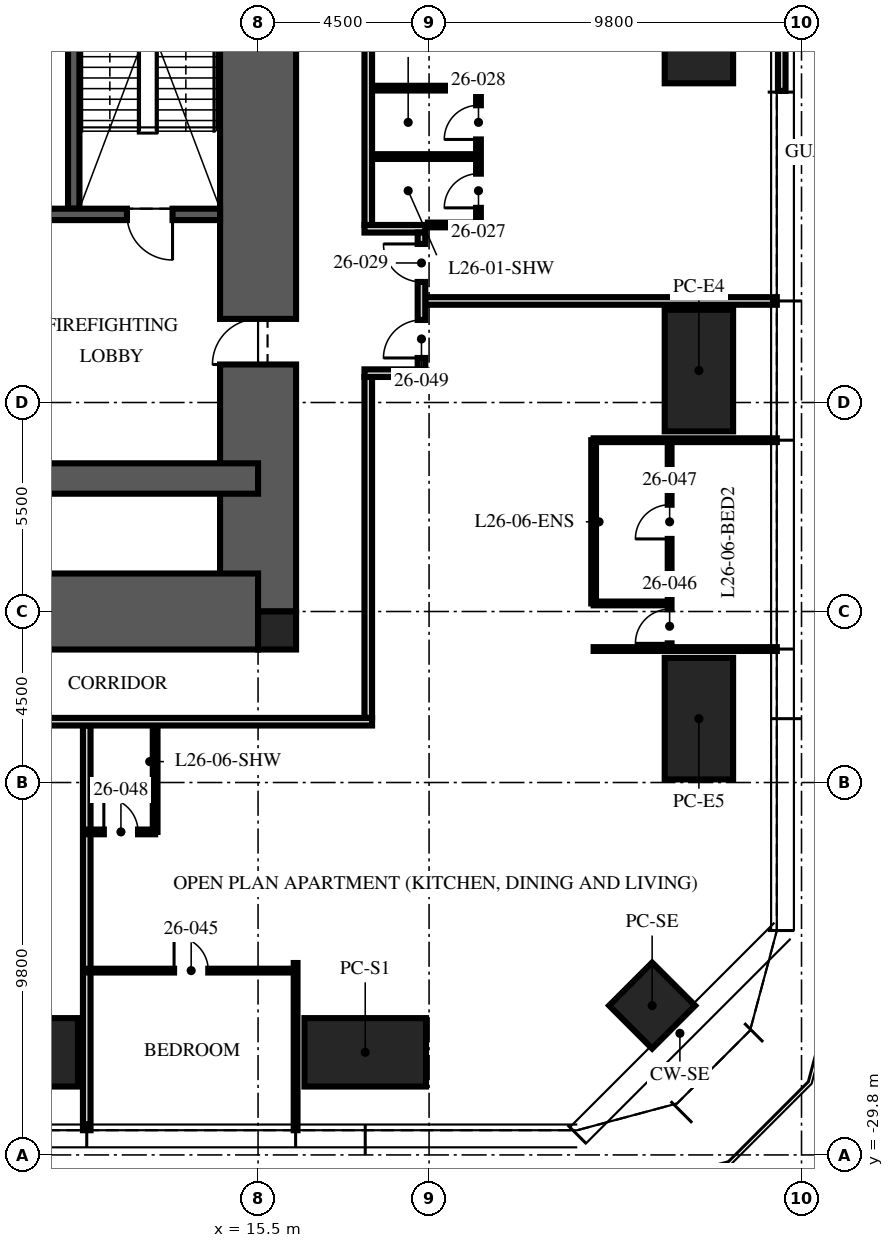
"""IFC4 building model, lengths in metres.
Left out: names, types, materials, properties, quantities, classifications, styles, units other than length and angle.
Written with IfcOpenShell. Run it as: python <this file> out.ifc"""

import sys

from ifc_helpers import new_model, si_unit, direction, frame, frame_2d, origin, origin_2d, place, context, subcontext, project, spatial, rectangle, hollow_rectangle, extrude, element, fill, save


model = new_model("IFC4")
c1 = context("Model", 3, precision=1e-05, world=origin(), true_north=direction((0.0, 1.0)))
c2 = subcontext(c1, "Body", "Model", "MODEL_VIEW")
j1 = project(units=[si_unit("LENGTHUNIT", "METRE"), si_unit("PLANEANGLEUNIT", "RADIAN")], contexts=[c1])
p1 = place(None, origin())
s1 = spatial("IfcSite", under=j1, at=p1, CompositionType="ELEMENT")
p2 = place(p1, origin())
s2 = spatial("IfcBuilding", under=s1, at=p2, CompositionType="ELEMENT")
p3 = place(p2, frame((0.0, 0.0, 107.25)))
s3 = spatial("IfcBuildingStorey", under=s2, at=p3, CompositionType="ELEMENT", Elevation=107.25)
p4 = place(p3, frame((15.5, -15.5, -0.25), z_axis=(0.0, 0.0, 1.0), x_axis=(0.0, 1.0, 0.0)))
e1 = element("IfcWall", 1, at=p4, inside=s3, PredefinedType="SHEAR", context=c2, shape_type="SweptSolid", body=[
    extrude(rectangle(XDim=31.0, YDim=2.0, at=frame_2d((15.5, 0.0))), origin(), (0.0, 0.0, 1.0), 3.75),
])
p5 = place(p4, frame((6.5, 0.0, 0.25)))
e2 = element("IfcOpeningElement", 2, at=p5, cuts=e1, PredefinedType="OPENING", context=c2, shape_type="SweptSolid", body=[
    extrude(rectangle(XDim=1.2, YDim=2.1, at=frame_2d((0.6, 1.05))), frame((0.0, 1.01, 0.0), z_axis=(0.0, -1.0, 0.0), x_axis=(1.0, 0.0, 0.0)), (0.0, 0.0, 1.0), 2.02),
])
p6 = place(p4, frame((23.0, 0.0, 0.25)))
e3 = element("IfcOpeningElement", 3, at=p6, cuts=e1, PredefinedType="OPENING", context=c2, shape_type="SweptSolid", body=[
    extrude(rectangle(XDim=1.8, YDim=2.1, at=frame_2d((0.9, 1.05))), frame((0.0, 1.01, 0.0), z_axis=(0.0, -1.0, 0.0), x_axis=(1.0, 0.0, 0.0)), (0.0, 0.0, 1.0), 2.02),
])
p7 = place(p3, frame((-15.5, -15.5, -0.25), z_axis=(0.0, 0.0, 1.0), x_axis=(1.0, 0.0, 0.0)))
e4 = element("IfcWall", 4, at=p7, inside=s3, PredefinedType="SHEAR", context=c2, shape_type="SweptSolid", body=[
    extrude(rectangle(XDim=31.0, YDim=2.0, at=frame_2d((15.5, 0.0))), origin(), (0.0, 0.0, 1.0), 3.75),
])
p8 = place(p7, frame((10.4, 0.0, 0.25)))
e5 = element("IfcOpeningElement", 5, at=p8, cuts=e4, PredefinedType="OPENING", context=c2, shape_type="SweptSolid", body=[
    extrude(rectangle(XDim=1.1, YDim=2.1, at=frame_2d((0.55, 1.05))), frame((0.0, 1.01, 0.0), z_axis=(0.0, -1.0, 0.0), x_axis=(1.0, 0.0, 0.0)), (0.0, 0.0, 1.0), 2.02),
])
p9 = place(p7, frame((13.5, 0.0, 0.25)))
e6 = element("IfcOpeningElement", 6, at=p9, cuts=e4, PredefinedType="OPENING", context=c2, shape_type="SweptSolid", body=[
    extrude(rectangle(XDim=1.1, YDim=2.1, at=frame_2d((0.55, 1.05))), frame((0.0, 1.01, 0.0), z_axis=(0.0, -1.0, 0.0), x_axis=(1.0, 0.0, 0.0)), (0.0, 0.0, 1.0), 2.02),
])
p10 = place(p7, frame((16.6, 0.0, 0.25)))
e7 = element("IfcOpeningElement", 7, at=p10, cuts=e4, PredefinedType="OPENING", context=c2, shape_type="SweptSolid", body=[
    extrude(rectangle(XDim=1.1, YDim=2.1, at=frame_2d((0.55, 1.05))), frame((0.0, 1.01, 0.0), z_axis=(0.0, -1.0, 0.0), x_axis=(1.0, 0.0, 0.0)), (0.0, 0.0, 1.0), 2.02),
])
p11 = place(p3, frame((-15.5, -12.0, -0.25), z_axis=(0.0, 0.0, 1.0), x_axis=(1.0, 0.0, 0.0)))
e8 = element("IfcWall", 8, at=p11, inside=s3, PredefinedType="SHEAR", context=c2, shape_type="SweptSolid", body=[
    extrude(rectangle(XDim=31.0, YDim=0.8, at=frame_2d((15.5, 0.0))), origin(), (0.0, 0.0, 1.0), 3.75),
])
p12 = place(p3, frame((16.0, -16.0, -0.25), z_axis=(0.0, 0.0, 1.0), x_axis=(1.0, 0.0, 0.0)))
e9 = element("IfcColumn", 9, at=p12, inside=s3, PredefinedType="COLUMN", context=c2, shape_type="SweptSolid", body=[
    extrude(rectangle(XDim=1.0, YDim=1.0, at=origin_2d()), origin(), (0.0, 0.0, 1.0), 3.75),
])
p13 = place(p3, frame((27.1, 0.0, -0.23), z_axis=(0.0, 0.0, 1.0), x_axis=(0.0, 1.0, 0.0)))
e10 = element("IfcColumn", 10, at=p13, inside=s3, PredefinedType="COLUMN", context=c2, shape_type="SweptSolid", body=[
    extrude(hollow_rectangle(XDim=3.2, YDim=1.8, WallThickness=0.2, at=origin_2d()), origin(), (0.0, 0.0, 1.0), 3.98),
])
p14 = place(p3, frame((27.1, -9.16, -0.07), z_axis=(0.0, 0.0, 1.0), x_axis=(0.0, 1.0, 0.0)))
e11 = element("IfcColumn", 11, at=p14, inside=s3, PredefinedType="COLUMN", context=c2, shape_type="SweptSolid", body=[
    extrude(hollow_rectangle(XDim=3.2, YDim=1.8, WallThickness=0.2, at=origin_2d()), origin(), (0.0, 0.0, 1.0), 3.82),
])
for number, where, z_axis, x_axis in (
    (12, (27.1, -18.32, 0.08), (0.0, 0.0, 1.0), (0.0, 1.0, 0.0)),
    (13, (18.32, -27.1, 0.08), (0.0, 0.0, 1.0), (1.0, 0.0, 0.0)),
):
    element("IfcColumn", number, at=place(p3, frame(where, z_axis=z_axis, x_axis=x_axis)), inside=s3, PredefinedType="COLUMN", context=c2, shape_type="SweptSolid", body=[
        extrude(hollow_rectangle(XDim=3.2, YDim=1.8, WallThickness=0.2, at=origin_2d()), origin(), (0.0, 0.0, 1.0), 3.67),
    ])
p15 = place(p3, frame((9.16, -27.1, -0.07), z_axis=(0.0, 0.0, 1.0), x_axis=(1.0, 0.0, 0.0)))
e14 = element("IfcColumn", 14, at=p15, inside=s3, PredefinedType="COLUMN", context=c2, shape_type="SweptSolid", body=[
    extrude(hollow_rectangle(XDim=3.2, YDim=1.8, WallThickness=0.2, at=origin_2d()), origin(), (0.0, 0.0, 1.0), 3.82),
])
p16 = place(p3, frame((25.87, -25.87, -0.19), z_axis=(0.0, 0.0, 1.0), x_axis=(0.707106781187, 0.707106781187, 0.0)))
e15 = element("IfcColumn", 15, at=p16, inside=s3, PredefinedType="COLUMN", context=c2, shape_type="SweptSolid", body=[
    extrude(hollow_rectangle(XDim=1.6, YDim=1.6, WallThickness=0.1, at=origin_2d()), origin(), (0.0, 0.0, 1.0), 3.94),
])
p17 = place(p3, frame((29.28, -1.8, 0.0), z_axis=(0.0, 0.0, 1.0), x_axis=(0.0, 1.0, 0.0)))
e16 = element("IfcWall", 16, at=p17, inside=s3, PredefinedType="ELEMENTEDWALL", context=c2, shape_type="SweptSolid", body=[
    extrude(rectangle(XDim=3.599, YDim=0.2, at=frame_2d((1.8, 0.0))), origin(), (0.0, 0.0, 1.0), 3.75),
])
p18 = place(p17, frame((1.3, 0.0, 0.0)))
e17 = element("IfcOpeningElement", 17, at=p18, cuts=e16, PredefinedType="OPENING", context=c2, shape_type="SweptSolid", body=[
    extrude(rectangle(XDim=1.0, YDim=2.4, at=frame_2d((0.5, 1.2))), frame((0.0, 0.11, 0.0), z_axis=(0.0, -1.0, 0.0), x_axis=(1.0, 0.0, 0.0)), (0.0, 0.0, 1.0), 0.22),
])
p19 = place(p3, frame((10.65, -4.9, 0.0), z_axis=(0.0, 0.0, 1.0), x_axis=(0.0, 1.0, 0.0)))
e18 = element("IfcWall", 18, at=p19, inside=s3, PredefinedType="SOLIDWALL", context=c2, shape_type="SweptSolid", body=[
    extrude(rectangle(XDim=10.1, YDim=0.3, at=frame_2d((5.05, 0.0))), origin(), (0.0, 0.0, 1.0), 3.5),
])
p20 = place(p3, frame((14.5, -5.05, 0.0), z_axis=(0.0, 0.0, 1.0), x_axis=(-1.0, 0.0, 0.0)))
e19 = element("IfcWall", 19, at=p20, inside=s3, PredefinedType="SOLIDWALL", context=c2, shape_type="SweptSolid", body=[
    extrude(rectangle(XDim=5.7, YDim=0.3, at=frame_2d((2.85, 0.0))), origin(), (0.0, 0.0, 1.0), 3.5),
])
p21 = place(p20, frame((1.25, 0.0, 0.0)))
e20 = element("IfcOpeningElement", 20, at=p21, cuts=e19, PredefinedType="OPENING", context=c2, shape_type="SweptSolid", body=[
    extrude(rectangle(XDim=1.2, YDim=2.1, at=frame_2d((0.6, 1.05))), frame((0.0, 0.16, 0.0), z_axis=(0.0, -1.0, 0.0), x_axis=(1.0, 0.0, 0.0)), (0.0, 0.0, 1.0), 0.32),
])
p22 = place(p3, frame((19.9, -7.328, 0.0), z_axis=(0.0, 0.0, 1.0), x_axis=(1.0, 0.0, 0.0)))
e21 = element("IfcWall", 21, at=p22, inside=s3, PredefinedType="PARTITIONING", context=c2, shape_type="SweptSolid", body=[
    extrude(rectangle(XDim=9.25, YDim=0.2, at=frame_2d((4.625, 0.0))), origin(), (0.0, 0.0, 1.0), 2.81),
])
p23 = place(p3, frame((10.992, -18.5, 0.0), z_axis=(0.0, 0.0, 1.0), x_axis=(0.0, -1.0, 0.0)))
e22 = element("IfcWall", 22, at=p23, inside=s3, PredefinedType="PARTITIONING", context=c2, shape_type="SweptSolid", body=[
    extrude(rectangle(XDim=10.65, YDim=0.2, at=frame_2d((5.325, 0.0))), origin(), (0.0, 0.0, 1.0), 2.81),
])
p24 = place(p3, frame((16.488, -24.75, 0.0), z_axis=(0.0, 0.0, 1.0), x_axis=(0.0, -1.0, 0.0)))
e23 = element("IfcWall", 23, at=p24, inside=s3, PredefinedType="PARTITIONING", context=c2, shape_type="SweptSolid", body=[
    extrude(rectangle(XDim=4.4, YDim=0.1, at=frame_2d((2.2, 0.0))), origin(), (0.0, 0.0, 1.0), 2.81),
])
for number, where, z_axis, x_axis in (
    (24, (24.33, -16.488, 0.0), (0.0, 0.0, 1.0), (1.0, 0.0, 0.0)),
    (25, (24.33, -10.992, 0.0), (0.0, 0.0, 1.0), (1.0, 0.0, 0.0)),
):
    element("IfcWall", number, at=place(p3, frame(where, z_axis=z_axis, x_axis=x_axis)), inside=s3, PredefinedType="PARTITIONING", context=c2, shape_type="SweptSolid", body=[
        extrude(rectangle(XDim=4.82, YDim=0.1, at=frame_2d((2.41, 0.0))), origin(), (0.0, 0.0, 1.0), 2.81),
    ])
p25 = place(p3, frame((21.3, -5.328, 0.0), z_axis=(0.0, 0.0, 1.0), x_axis=(0.0, 1.0, 0.0)))
e26 = element("IfcWall", 26, at=p25, inside=s3, PredefinedType="PARTITIONING", context=c2, shape_type="SweptSolid", body=[
    extrude(rectangle(XDim=3.6, YDim=0.125, at=frame_2d((1.8, 0.0))), origin(), (0.0, 0.0, 1.0), 2.81),
])
p26 = place(p25, frame((0.45, 0.0, 0.0)))
e27 = element("IfcOpeningElement", 27, at=p26, cuts=e26, PredefinedType="OPENING", context=c2, shape_type="SweptSolid", body=[
    extrude(rectangle(XDim=0.9, YDim=2.1, at=frame_2d((0.45, 1.05))), frame((0.0, 0.073, 0.0), z_axis=(0.0, -1.0, 0.0), x_axis=(1.0, 0.0, 0.0)), (0.0, 0.0, 1.0), 0.145),
])
p27 = place(p25, frame((2.25, 0.0, 0.0)))
e28 = element("IfcOpeningElement", 28, at=p27, cuts=e26, PredefinedType="OPENING", context=c2, shape_type="SweptSolid", body=[
    extrude(rectangle(XDim=0.9, YDim=2.1, at=frame_2d((0.45, 1.05))), frame((0.0, 0.073, 0.0), z_axis=(0.0, -1.0, 0.0), x_axis=(1.0, 0.0, 0.0)), (0.0, 0.0, 1.0), 0.145),
])
p28 = place(p3, frame((19.97, -5.328, 0.0), z_axis=(0.0, 0.0, 1.0), x_axis=(1.0, 0.0, 0.0)))
e29 = element("IfcWall", 29, at=p28, inside=s3, PredefinedType="PARTITIONING", context=c2, shape_type="SweptSolid", body=[
    extrude(rectangle(XDim=1.33, YDim=0.125, at=frame_2d((0.665, 0.0))), origin(), (0.0, 0.0, 1.0), 3.5),
])
for number, where, z_axis, x_axis in (
    (30, (18.5, -3.528, 0.0), (0.0, 0.0, 1.0), (1.0, 0.0, 0.0)),
    (31, (18.5, -1.728, 0.0), (0.0, 0.0, 1.0), (1.0, 0.0, 0.0)),
):
    element("IfcWall", number, at=place(p3, frame(where, z_axis=z_axis, x_axis=x_axis)), inside=s3, PredefinedType="PARTITIONING", context=c2, shape_type="SweptSolid", body=[
        extrude(rectangle(XDim=2.8, YDim=0.125, at=frame_2d((1.4, 0.0))), origin(), (0.0, 0.0, 1.0), 3.5),
    ])
p29 = place(p3, frame((10.992, -24.95, 0.0), z_axis=(0.0, 0.0, 1.0), x_axis=(1.0, 0.0, 0.0)))
e32 = element("IfcWall", 32, at=p29, inside=s3, PredefinedType="PARTITIONING", context=c2, shape_type="SweptSolid", body=[
    extrude(rectangle(XDim=5.496, YDim=0.1, at=frame_2d((2.748, 0.0))), origin(), (0.0, 0.0, 1.0), 2.81),
])
p30 = place(p29, frame((2.298, 0.0, 0.0)))
e33 = element("IfcOpeningElement", 33, at=p30, cuts=e32, PredefinedType="OPENING", context=c2, shape_type="SweptSolid", body=[
    extrude(rectangle(XDim=0.9, YDim=2.1, at=frame_2d((0.45, 1.05))), frame((0.0, 0.06, 0.0), z_axis=(0.0, -1.0, 0.0), x_axis=(1.0, 0.0, 0.0)), (0.0, 0.0, 1.0), 0.12),
])
p31 = place(p3, frame((26.33, -16.488, 0.0), z_axis=(0.0, 0.0, 1.0), x_axis=(0.0, 1.0, 0.0)))
e34 = element("IfcWall", 34, at=p31, inside=s3, PredefinedType="PARTITIONING", context=c2, shape_type="SweptSolid", body=[
    extrude(rectangle(XDim=5.496, YDim=0.1, at=frame_2d((2.748, 0.0))), origin(), (0.0, 0.0, 1.0), 2.81),
])
p32 = place(p31, frame((0.15, 0.0, 0.0)))
e35 = element("IfcOpeningElement", 35, at=p32, cuts=e34, PredefinedType="OPENING", context=c2, shape_type="SweptSolid", body=[
    extrude(rectangle(XDim=0.9, YDim=2.1, at=frame_2d((0.45, 1.05))), frame((0.0, 0.06, 0.0), z_axis=(0.0, -1.0, 0.0), x_axis=(1.0, 0.0, 0.0)), (0.0, 0.0, 1.0), 0.12),
])
p33 = place(p31, frame((2.898, 0.0, 0.0)))
e36 = element("IfcOpeningElement", 36, at=p33, cuts=e34, PredefinedType="OPENING", context=c2, shape_type="SweptSolid", body=[
    extrude(rectangle(XDim=0.9, YDim=2.1, at=frame_2d((0.45, 1.05))), frame((0.0, 0.06, 0.0), z_axis=(0.0, -1.0, 0.0), x_axis=(1.0, 0.0, 0.0)), (0.0, 0.0, 1.0), 0.12),
])
p34 = place(p3, frame((24.33, -15.288, 0.0), z_axis=(0.0, 0.0, 1.0), x_axis=(1.0, 0.0, 0.0)))
e37 = element("IfcWall", 37, at=p34, inside=s3, PredefinedType="PARTITIONING", context=c2, shape_type="SweptSolid", body=[
    extrude(rectangle(XDim=2.0, YDim=0.1, at=frame_2d((1.0, 0.0))), origin(), (0.0, 0.0, 1.0), 3.5),
])
p35 = place(p3, frame((24.33, -15.288, 0.0), z_axis=(0.0, 0.0, 1.0), x_axis=(0.0, 1.0, 0.0)))
e38 = element("IfcWall", 38, at=p35, inside=s3, PredefinedType="PARTITIONING", context=c2, shape_type="SweptSolid", body=[
    extrude(rectangle(XDim=4.296, YDim=0.125, at=frame_2d((2.148, 0.0))), origin(), (0.0, 0.0, 1.0), 2.81),
])
p36 = place(p3, frame((10.992, -21.3, 0.0), z_axis=(0.0, 0.0, 1.0), x_axis=(1.0, 0.0, 0.0)))
e39 = element("IfcWall", 39, at=p36, inside=s3, PredefinedType="PARTITIONING", context=c2, shape_type="SweptSolid", body=[
    extrude(rectangle(XDim=1.8, YDim=0.125, at=frame_2d((0.9, 0.0))), origin(), (0.0, 0.0, 1.0), 3.5),
])
p37 = place(p36, frame((0.45, 0.0, 0.0)))
e40 = element("IfcOpeningElement", 40, at=p37, cuts=e39, PredefinedType="OPENING", context=c2, shape_type="SweptSolid", body=[
    extrude(rectangle(XDim=0.9, YDim=2.1, at=frame_2d((0.45, 1.05))), frame((0.0, 0.073, 0.0), z_axis=(0.0, -1.0, 0.0), x_axis=(1.0, 0.0, 0.0)), (0.0, 0.0, 1.0), 0.145),
])
p38 = place(p3, frame((12.792, -18.5, 0.0), z_axis=(0.0, 0.0, 1.0), x_axis=(0.0, -1.0, 0.0)))
e41 = element("IfcWall", 41, at=p38, inside=s3, PredefinedType="PARTITIONING", context=c2, shape_type="SweptSolid", body=[
    extrude(rectangle(XDim=2.8, YDim=0.125, at=frame_2d((1.4, 0.0))), origin(), (0.0, 0.0, 1.0), 3.5),
])
p39 = place(p3, frame((18.4, -18.3, 0.0), z_axis=(0.0, 0.0, 1.0), x_axis=(0.0, 1.0, 0.0)))
e42 = element("IfcWall", 42, at=p39, inside=s3, PredefinedType="PARTITIONING", context=c2, shape_type="SweptSolid", body=[
    extrude(rectangle(XDim=8.972, YDim=0.2, at=frame_2d((4.486, 0.0))), origin(), (0.0, 0.0, 1.0), 2.3),
])
p40 = place(p3, frame((18.3, -9.228, 0.0), z_axis=(0.0, 0.0, 1.0), x_axis=(1.0, 0.0, 0.0)))
e43 = element("IfcWall", 43, at=p40, inside=s3, PredefinedType="PARTITIONING", context=c2, shape_type="SweptSolid", body=[
    extrude(rectangle(XDim=1.6, YDim=0.2, at=frame_2d((0.8, 0.0))), origin(), (0.0, 0.0, 1.0), 2.7),
])
p41 = place(p3, frame((18.3, -5.428, 0.0), z_axis=(0.0, 0.0, 1.0), x_axis=(1.0, 0.0, 0.0)))
e44 = element("IfcWall", 44, at=p41, inside=s3, PredefinedType="PARTITIONING", context=c2, shape_type="SweptSolid", body=[
    extrude(rectangle(XDim=1.6, YDim=0.2, at=frame_2d((0.8, 0.0))), origin(), (0.0, 0.0, 1.0), 3.5),
])
p42 = place(p3, frame((19.8, -9.128, 0.0), z_axis=(0.0, 0.0, 1.0), x_axis=(0.0, 1.0, 0.0)))
e45 = element("IfcWall", 45, at=p42, inside=s3, PredefinedType="PARTITIONING", context=c2, shape_type="SweptSolid", body=[
    extrude(rectangle(XDim=3.6, YDim=0.2, at=frame_2d((1.8, 0.0))), origin(), (0.0, 0.0, 1.0), 2.7),
])
p43 = place(p42, frame((2.3, 0.0, 0.0)))
e46 = element("IfcOpeningElement", 46, at=p43, cuts=e45, PredefinedType="OPENING", context=c2, shape_type="SweptSolid", body=[
    extrude(rectangle(XDim=1.0, YDim=2.2, at=frame_2d((0.5, 1.1))), frame((0.0, 0.11, 0.0), z_axis=(0.0, -1.0, 0.0), x_axis=(1.0, 0.0, 0.0)), (0.0, 0.0, 1.0), 0.22),
])
p44 = place(p42, frame((0.3, 0.0, 0.0)))
e47 = element("IfcOpeningElement", 47, at=p44, cuts=e45, PredefinedType="OPENING", context=c2, shape_type="SweptSolid", body=[
    extrude(rectangle(XDim=1.0, YDim=2.2, at=frame_2d((0.5, 1.1))), frame((0.0, 0.11, 0.0), z_axis=(0.0, -1.0, 0.0), x_axis=(1.0, 0.0, 0.0)), (0.0, 0.0, 1.0), 0.22),
])
p45 = place(p3, frame((18.4, -5.328, 0.0), z_axis=(0.0, 0.0, 1.0), x_axis=(0.0, 1.0, 0.0)))
e48 = element("IfcWall", 48, at=p45, inside=s3, PredefinedType="PARTITIONING", context=c2, shape_type="SweptSolid", body=[
    extrude(rectangle(XDim=22.028, YDim=0.2, at=frame_2d((11.014, 0.0))), origin(), (0.0, 0.0, 1.0), 2.7),
])
p46 = place(p3, frame((18.5, -18.4, 0.0), z_axis=(0.0, 0.0, 1.0), x_axis=(-1.0, 0.0, 0.0)))
e49 = element("IfcWall", 49, at=p46, inside=s3, PredefinedType="PARTITIONING", context=c2, shape_type="SweptSolid", body=[
    extrude(rectangle(XDim=12.9, YDim=0.2, at=frame_2d((6.45, 0.0))), origin(), (0.0, 0.0, 1.0), 2.3),
])
p47 = place(p21, origin())
e50 = element("IfcDoor", 50, at=p47, inside=s3, OperationType="SINGLE_SWING_LEFT", PredefinedType="DOOR", context=c2, shape_type="SweptSolid", body=[
    extrude(rectangle(XDim=1.2, YDim=2.1, at=frame_2d((0.6, 1.05))), frame((0.0, 0.025, 0.0), z_axis=(0.0, -1.0, 0.0), x_axis=(1.0, 0.0, 0.0)), (0.0, 0.0, 1.0), 0.05),
])
fill(e20, e50)
p48 = place(p5, origin())
e51 = element("IfcDoor", 51, at=p48, inside=s3, OperationType="SINGLE_SWING_LEFT", PredefinedType="DOOR", context=c2, shape_type="SweptSolid", body=[
    extrude(rectangle(XDim=1.2, YDim=2.1, at=frame_2d((0.6, 1.05))), frame((0.0, 0.025, 0.0), z_axis=(0.0, -1.0, 0.0), x_axis=(1.0, 0.0, 0.0)), (0.0, 0.0, 1.0), 0.05),
])
fill(e2, e51)
p49 = place(p26, origin())
e52 = element("IfcDoor", 52, at=p49, inside=s3, OperationType="SINGLE_SWING_LEFT", PredefinedType="DOOR", context=c2, shape_type="SweptSolid", body=[
    extrude(rectangle(XDim=0.9, YDim=2.1, at=frame_2d((0.45, 1.05))), frame((0.0, 0.025, 0.0), z_axis=(0.0, -1.0, 0.0), x_axis=(1.0, 0.0, 0.0)), (0.0, 0.0, 1.0), 0.05),
])
fill(e27, e52)
p50 = place(p27, origin())
e53 = element("IfcDoor", 53, at=p50, inside=s3, OperationType="SINGLE_SWING_LEFT", PredefinedType="DOOR", context=c2, shape_type="SweptSolid", body=[
    extrude(rectangle(XDim=0.9, YDim=2.1, at=frame_2d((0.45, 1.05))), frame((0.0, 0.025, 0.0), z_axis=(0.0, -1.0, 0.0), x_axis=(1.0, 0.0, 0.0)), (0.0, 0.0, 1.0), 0.05),
])
fill(e28, e53)
p51 = place(p43, origin())
e54 = element("IfcDoor", 54, at=p51, inside=s3, OperationType="SINGLE_SWING_RIGHT", PredefinedType="DOOR", context=c2, shape_type="SweptSolid", body=[
    extrude(rectangle(XDim=1.0, YDim=2.2, at=frame_2d((0.5, 1.1))), frame((0.0, 0.025, 0.0), z_axis=(0.0, -1.0, 0.0), x_axis=(1.0, 0.0, 0.0)), (0.0, 0.0, 1.0), 0.05),
])
fill(e46, e54)
p52 = place(p30, origin())
e55 = element("IfcDoor", 55, at=p52, inside=s3, OperationType="SINGLE_SWING_LEFT", PredefinedType="DOOR", context=c2, shape_type="SweptSolid", body=[
    extrude(rectangle(XDim=0.9, YDim=2.1, at=frame_2d((0.45, 1.05))), frame((0.0, 0.025, 0.0), z_axis=(0.0, -1.0, 0.0), x_axis=(1.0, 0.0, 0.0)), (0.0, 0.0, 1.0), 0.05),
])
fill(e33, e55)
p53 = place(p32, origin())
e56 = element("IfcDoor", 56, at=p53, inside=s3, OperationType="SINGLE_SWING_LEFT", PredefinedType="DOOR", context=c2, shape_type="SweptSolid", body=[
    extrude(rectangle(XDim=0.9, YDim=2.1, at=frame_2d((0.45, 1.05))), frame((0.0, 0.025, 0.0), z_axis=(0.0, -1.0, 0.0), x_axis=(1.0, 0.0, 0.0)), (0.0, 0.0, 1.0), 0.05),
])
fill(e35, e56)
p54 = place(p33, origin())
e57 = element("IfcDoor", 57, at=p54, inside=s3, OperationType="SINGLE_SWING_LEFT", PredefinedType="DOOR", context=c2, shape_type="SweptSolid", body=[
    extrude(rectangle(XDim=0.9, YDim=2.1, at=frame_2d((0.45, 1.05))), frame((0.0, 0.025, 0.0), z_axis=(0.0, -1.0, 0.0), x_axis=(1.0, 0.0, 0.0)), (0.0, 0.0, 1.0), 0.05),
])
fill(e36, e57)
p55 = place(p37, origin())
e58 = element("IfcDoor", 58, at=p55, inside=s3, OperationType="SINGLE_SWING_LEFT", PredefinedType="DOOR", context=c2, shape_type="SweptSolid", body=[
    extrude(rectangle(XDim=0.9, YDim=2.1, at=frame_2d((0.45, 1.05))), frame((0.0, 0.025, 0.0), z_axis=(0.0, -1.0, 0.0), x_axis=(1.0, 0.0, 0.0)), (0.0, 0.0, 1.0), 0.05),
])
fill(e40, e58)
p56 = place(p44, origin())
e59 = element("IfcDoor", 59, at=p56, inside=s3, OperationType="SINGLE_SWING_LEFT", PredefinedType="DOOR", context=c2, shape_type="SweptSolid", body=[
    extrude(rectangle(XDim=1.0, YDim=2.2, at=frame_2d((0.5, 1.1))), frame((0.0, 0.025, 0.0), z_axis=(0.0, -1.0, 0.0), x_axis=(1.0, 0.0, 0.0)), (0.0, 0.0, 1.0), 0.05),
])
fill(e47, e59)
save(model, sys.argv[1])
